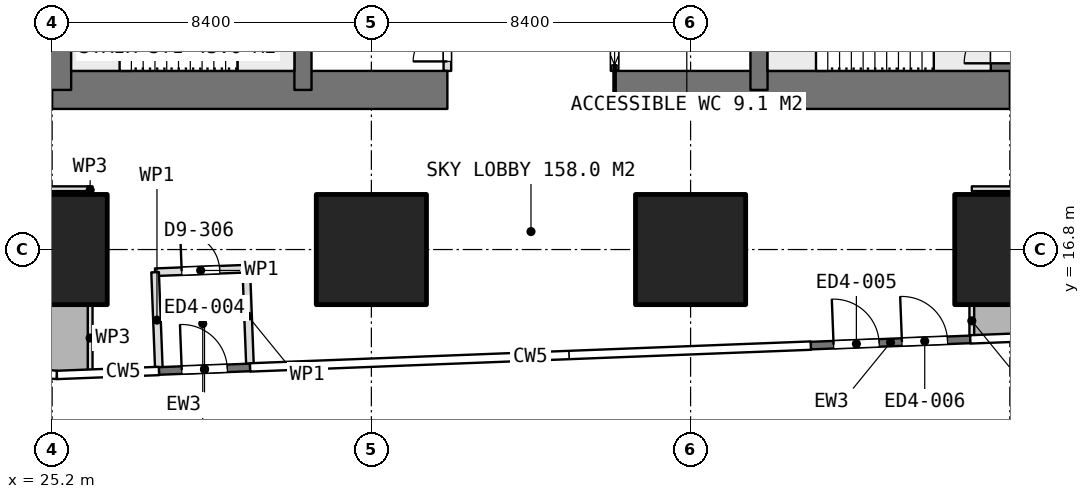
"""IFC4 building model, lengths in metres.
Left out: names, types, materials, properties, quantities, classifications, styles, units other than length and angle.
Written with IfcOpenShell. Run it as: python <this file> out.ifc"""

import sys

from ifc_helpers import new_model, si_unit, direction, frame, frame_2d, origin, origin_2d, place, context, subcontext, project, spatial, rectangle, extrude, element, fill, save


model = new_model("IFC4")
c1 = context("Model", 3, precision=1e-05, world=origin(), true_north=direction((0.0, 1.0)))
c2 = subcontext(c1, "Body", "Model", "MODEL_VIEW")
j1 = project(units=[si_unit("LENGTHUNIT", "METRE"), si_unit("PLANEANGLEUNIT", "RADIAN")], contexts=[c1])
p1 = place(None, origin())
s1 = spatial("IfcSite", under=j1, at=p1, CompositionType="ELEMENT")
p2 = place(p1, origin())
s2 = spatial("IfcBuilding", under=s1, at=p2, CompositionType="ELEMENT")
p3 = place(p2, frame((0.0, 0.0, 90.8)))
s3 = spatial("IfcBuildingStorey", under=s2, at=p3, CompositionType="ELEMENT", Elevation=90.8)
p4 = place(p3, frame((25.2, 21.0, 0.0), z_axis=(0.0, 0.0, 1.0), x_axis=(1.0, 0.0, 0.0)))
e1 = element("IfcWall", 1, at=p4, inside=s3, PredefinedType="SHEAR", context=c2, shape_type="SweptSolid", body=[
    extrude(rectangle(XDim=10.4, YDim=1.0, at=frame_2d((5.2, 0.0))), origin(), (0.0, 0.0, 1.0), 4.5),
])
p5 = place(p3, frame((40.0, 21.0, 0.0), z_axis=(0.0, 0.0, 1.0), x_axis=(1.0, 0.0, 0.0)))
e2 = element("IfcWall", 2, at=p5, inside=s3, PredefinedType="SHEAR", context=c2, shape_type="SweptSolid", body=[
    extrude(rectangle(XDim=10.4, YDim=1.0, at=frame_2d((5.2, 0.0))), origin(), (0.0, 0.0, 1.0), 4.5),
])
p6 = place(p3, frame((25.2, 21.0, 0.0), z_axis=(0.0, 0.0, 1.0), x_axis=(0.0, 1.0, 0.0)))
e3 = element("IfcWall", 3, at=p6, inside=s3, PredefinedType="SHEAR", context=c2, shape_type="SweptSolid", body=[
    extrude(rectangle(XDim=25.2, YDim=1.0, at=frame_2d((12.6, 0.0))), origin(), (0.0, 0.0, 1.0), 4.5),
])
p7 = place(p6, frame((7.8, 0.0, 0.0)))
e4 = element("IfcOpeningElement", 4, at=p7, cuts=e3, PredefinedType="OPENING", context=c2, shape_type="SweptSolid", body=[
    extrude(rectangle(XDim=1.2, YDim=2.1, at=frame_2d((0.6, 1.05))), frame((0.0, 0.51, 0.0), z_axis=(0.0, -1.0, 0.0), x_axis=(1.0, 0.0, 0.0)), (0.0, 0.0, 1.0), 1.02),
])
p8 = place(p6, frame((14.25, 0.0, 0.0)))
e5 = element("IfcOpeningElement", 5, at=p8, cuts=e3, PredefinedType="OPENING", context=c2, shape_type="SweptSolid", body=[
    extrude(rectangle(XDim=0.9, YDim=2.1, at=frame_2d((0.45, 1.05))), frame((0.0, 0.51, 0.0), z_axis=(0.0, -1.0, 0.0), x_axis=(1.0, 0.0, 0.0)), (0.0, 0.0, 1.0), 1.02),
])
p9 = place(p6, frame((16.85, 0.0, 0.0)))
e6 = element("IfcOpeningElement", 6, at=p9, cuts=e3, PredefinedType="OPENING", context=c2, shape_type="SweptSolid", body=[
    extrude(rectangle(XDim=0.9, YDim=2.1, at=frame_2d((0.45, 1.05))), frame((0.0, 0.51, 0.0), z_axis=(0.0, -1.0, 0.0), x_axis=(1.0, 0.0, 0.0)), (0.0, 0.0, 1.0), 1.02),
])
p10 = place(p6, frame((19.025, 0.0, 0.0)))
e7 = element("IfcOpeningElement", 7, at=p10, cuts=e3, PredefinedType="OPENING", context=c2, shape_type="SweptSolid", body=[
    extrude(rectangle(XDim=1.2, YDim=2.1, at=frame_2d((0.6, 1.05))), frame((0.0, 0.51, 0.0), z_axis=(0.0, -1.0, 0.0), x_axis=(1.0, 0.0, 0.0)), (0.0, 0.0, 1.0), 1.02),
])
p11 = place(p3, frame((50.4, 21.0, 0.0), z_axis=(0.0, 0.0, 1.0), x_axis=(0.0, 1.0, 0.0)))
e8 = element("IfcWall", 8, at=p11, inside=s3, PredefinedType="SHEAR", context=c2, shape_type="SweptSolid", body=[
    extrude(rectangle(XDim=25.2, YDim=1.0, at=frame_2d((12.6, 0.0))), origin(), (0.0, 0.0, 1.0), 4.5),
])
p12 = place(p11, frame((16.2, 0.0, 0.0)))
e9 = element("IfcOpeningElement", 9, at=p12, cuts=e8, PredefinedType="OPENING", context=c2, shape_type="SweptSolid", body=[
    extrude(rectangle(XDim=1.2, YDim=2.1, at=frame_2d((0.6, 1.05))), frame((0.0, 0.51, 0.0), z_axis=(0.0, -1.0, 0.0), x_axis=(1.0, 0.0, 0.0)), (0.0, 0.0, 1.0), 1.02),
])
p13 = place(p11, frame((10.05, 0.0, 0.0)))
e10 = element("IfcOpeningElement", 10, at=p13, cuts=e8, PredefinedType="OPENING", context=c2, shape_type="SweptSolid", body=[
    extrude(rectangle(XDim=0.9, YDim=2.1, at=frame_2d((0.45, 1.05))), frame((0.0, 0.51, 0.0), z_axis=(0.0, -1.0, 0.0), x_axis=(1.0, 0.0, 0.0)), (0.0, 0.0, 1.0), 1.02),
])
p14 = place(p11, frame((7.45, 0.0, 0.0)))
e11 = element("IfcOpeningElement", 11, at=p14, cuts=e8, PredefinedType="OPENING", context=c2, shape_type="SweptSolid", body=[
    extrude(rectangle(XDim=0.9, YDim=2.1, at=frame_2d((0.45, 1.05))), frame((0.0, 0.51, 0.0), z_axis=(0.0, -1.0, 0.0), x_axis=(1.0, 0.0, 0.0)), (0.0, 0.0, 1.0), 1.02),
])
p15 = place(p11, frame((0.7, 0.0, 0.0)))
e12 = element("IfcOpeningElement", 12, at=p15, cuts=e8, PredefinedType="OPENING", context=c2, shape_type="SweptSolid", body=[
    extrude(rectangle(XDim=1.2, YDim=2.1, at=frame_2d((0.6, 1.05))), frame((0.0, 0.51, 0.0), z_axis=(0.0, -1.0, 0.0), x_axis=(1.0, 0.0, 0.0)), (0.0, 0.0, 1.0), 1.02),
])
for number, where, z_axis, x_axis in (
    (13, (31.8, 21.0, 0.0), (0.0, 0.0, 1.0), (0.0, 1.0, 0.0)),
    (14, (43.8, 21.0, 0.0), (0.0, 0.0, 1.0), (0.0, 1.0, 0.0)),
):
    element("IfcWall", number, at=place(p3, frame(where, z_axis=z_axis, x_axis=x_axis)), inside=s3, PredefinedType="SHEAR", context=c2, shape_type="SweptSolid", body=[
        extrude(rectangle(XDim=25.2, YDim=0.45, at=frame_2d((12.6, 0.0))), origin(), (0.0, 0.0, 1.0), 4.5),
    ])
for number, where, z_axis, x_axis in (
    (15, (25.2, 16.8, 0.0), (0.0, 0.0, 1.0), (1.0, 0.0, 0.0)),
    (16, (33.6, 16.8, 0.0), (0.0, 0.0, 1.0), (1.0, 0.0, 0.0)),
    (17, (42.0, 16.8, 0.0), (0.0, 0.0, 1.0), (1.0, 0.0, 0.0)),
    (18, (50.4, 16.8, 0.0), (0.0, 0.0, 1.0), (1.0, 0.0, 0.0)),
):
    element("IfcColumn", number, at=place(p3, frame(where, z_axis=z_axis, x_axis=x_axis)), inside=s3, PredefinedType="COLUMN", context=c2, shape_type="SweptSolid", body=[
        extrude(rectangle(XDim=2.9, YDim=2.9, at=origin_2d()), origin(), (0.0, 0.0, 1.0), 4.5),
    ])
p16 = place(p3, frame((45.163, 14.272, 0.0), z_axis=(0.0, 0.0, 1.0), x_axis=(0.999243554769, 0.03888853625, 0.0)))
e19 = element("IfcWall", 19, at=p16, inside=s3, PredefinedType="SOLIDWALL", context=c2, shape_type="SweptSolid", body=[
    extrude(rectangle(XDim=4.2, YDim=0.2, at=frame_2d((2.1, 0.0))), origin(), (0.0, 0.0, 1.0), 4.25),
])
p17 = place(p16, frame((0.6, 0.0, 0.0)))
e20 = element("IfcOpeningElement", 20, at=p17, cuts=e19, PredefinedType="OPENING", context=c2, shape_type="SweptSolid", body=[
    extrude(rectangle(XDim=1.2, YDim=2.4, at=frame_2d((0.6, 1.2))), frame((0.0, 0.11, 0.0), z_axis=(0.0, -1.0, 0.0), x_axis=(1.0, 0.0, 0.0)), (0.0, 0.0, 1.0), 0.22),
])
p18 = place(p16, frame((2.4, 0.0, 0.0)))
e21 = element("IfcOpeningElement", 21, at=p18, cuts=e19, PredefinedType="OPENING", context=c2, shape_type="SweptSolid", body=[
    extrude(rectangle(XDim=1.2, YDim=2.4, at=frame_2d((0.6, 1.2))), frame((0.0, 0.11, 0.0), z_axis=(0.0, -1.0, 0.0), x_axis=(1.0, 0.0, 0.0)), (0.0, 0.0, 1.0), 0.22),
])
p19 = place(p3, frame((28.01, 13.605, 0.0), z_axis=(0.0, 0.0, 1.0), x_axis=(0.999240750633, 0.038960521988, 0.0)))
e22 = element("IfcWall", 22, at=p19, inside=s3, PredefinedType="SOLIDWALL", context=c2, shape_type="SweptSolid", body=[
    extrude(rectangle(XDim=2.4, YDim=0.2, at=frame_2d((1.2, 0.0))), origin(), (0.0, 0.0, 1.0), 4.25),
])
p20 = place(p19, frame((0.6, 0.0, 0.0)))
e23 = element("IfcOpeningElement", 23, at=p20, cuts=e22, PredefinedType="OPENING", context=c2, shape_type="SweptSolid", body=[
    extrude(rectangle(XDim=1.2, YDim=2.4, at=frame_2d((0.6, 1.2))), frame((0.0, 0.11, 0.0), z_axis=(0.0, -1.0, 0.0), x_axis=(1.0, 0.0, 0.0)), (0.0, 0.0, 1.0), 0.22),
])
p21 = place(p3, frame((40.0, 21.5, 0.0), z_axis=(0.0, 0.0, 1.0), x_axis=(0.0, 1.0, 0.0)))
e24 = element("IfcWall", 24, at=p21, inside=s3, PredefinedType="PARTITIONING", context=c2, shape_type="SweptSolid", body=[
    extrude(rectangle(XDim=1.675, YDim=0.2, at=frame_2d((0.837, 0.0))), origin(), (0.0, 0.0, 1.0), 4.25),
])
p22 = place(p21, frame((0.15, 0.0, 0.0)))
e25 = element("IfcOpeningElement", 25, at=p22, cuts=e24, PredefinedType="OPENING", context=c2, shape_type="SweptSolid", body=[
    extrude(rectangle(XDim=1.1, YDim=2.1, at=frame_2d((0.55, 1.05))), frame((0.0, 0.11, 0.0), z_axis=(0.0, -1.0, 0.0), x_axis=(1.0, 0.0, 0.0)), (0.0, 0.0, 1.0), 0.22),
])
p23 = place(p3, frame((35.6, 21.5, 0.0), z_axis=(0.0, 0.0, 1.0), x_axis=(0.0, 1.0, 0.0)))
e26 = element("IfcWall", 26, at=p23, inside=s3, PredefinedType="PARTITIONING", context=c2, shape_type="SweptSolid", body=[
    extrude(rectangle(XDim=1.675, YDim=0.2, at=frame_2d((0.837, 0.0))), origin(), (0.0, 0.0, 1.0), 4.25),
])
p24 = place(p23, frame((0.25, 0.0, 0.0)))
e27 = element("IfcOpeningElement", 27, at=p24, cuts=e26, PredefinedType="OPENING", context=c2, shape_type="SweptSolid", body=[
    extrude(rectangle(XDim=0.9, YDim=2.1, at=frame_2d((0.45, 1.05))), frame((0.0, 0.11, 0.0), z_axis=(0.0, -1.0, 0.0), x_axis=(1.0, 0.0, 0.0)), (0.0, 0.0, 1.0), 0.22),
])
p25 = place(p3, frame((49.4, 18.4, 0.0), z_axis=(0.0, 0.0, 1.0), x_axis=(1.0, 0.0, 0.0)))
e28 = element("IfcWall", 28, at=p25, inside=s3, PredefinedType="PARTITIONING", context=c2, shape_type="SweptSolid", body=[
    extrude(rectangle(XDim=7.0, YDim=0.125, at=frame_2d((3.5, 0.0))), origin(), (0.0, 0.0, 1.0), 4.25),
])
p26 = place(p3, frame((49.4, 14.517, 0.0), z_axis=(0.0, 0.0, 1.0), x_axis=(0.0, 1.0, 0.0)))
e29 = element("IfcWall", 29, at=p26, inside=s3, PredefinedType="PARTITIONING", context=c2, shape_type="SweptSolid", body=[
    extrude(rectangle(XDim=0.813, YDim=0.125, at=frame_2d((0.406, 0.0))), origin(), (0.0, 0.0, 1.0), 4.25),
])
p27 = place(p3, frame((19.2, 18.4, 0.0), z_axis=(0.0, 0.0, 1.0), x_axis=(1.0, 0.0, 0.0)))
e30 = element("IfcWall", 30, at=p27, inside=s3, PredefinedType="PARTITIONING", context=c2, shape_type="SweptSolid", body=[
    extrude(rectangle(XDim=7.0, YDim=0.125, at=frame_2d((3.5, 0.0))), origin(), (0.0, 0.0, 1.0), 4.25),
])
p28 = place(p27, frame((2.6, 0.0, 0.0)))
e31 = element("IfcOpeningElement", 31, at=p28, cuts=e30, PredefinedType="OPENING", context=c2, shape_type="SweptSolid", body=[
    extrude(rectangle(XDim=1.8, YDim=2.1, at=frame_2d((0.9, 1.05))), frame((0.0, 0.073, 0.0), z_axis=(0.0, -1.0, 0.0), x_axis=(1.0, 0.0, 0.0)), (0.0, 0.0, 1.0), 0.145),
])
p29 = place(p3, frame((26.2, 15.33, 0.0), z_axis=(0.0, 0.0, 1.0), x_axis=(0.0, -1.0, 0.0)))
e32 = element("IfcWall", 32, at=p29, inside=s3, PredefinedType="PARTITIONING", context=c2, shape_type="SweptSolid", body=[
    extrude(rectangle(XDim=1.716, YDim=0.125, at=frame_2d((0.858, 0.0))), origin(), (0.0, 0.0, 1.0), 4.25),
])
p30 = place(p3, frame((27.909, 16.203, 0.0), z_axis=(0.0, 0.0, 1.0), x_axis=(0.999248497687, 0.038761319244, 0.0)))
e33 = element("IfcWall", 33, at=p30, inside=s3, PredefinedType="PARTITIONING", context=c2, shape_type="SweptSolid", body=[
    extrude(rectangle(XDim=2.4, YDim=0.2, at=frame_2d((1.2, 0.0))), origin(), (0.0, 0.0, 1.0), 4.25),
])
p31 = place(p30, frame((0.7, 0.0, 0.0)))
e34 = element("IfcOpeningElement", 34, at=p31, cuts=e33, PredefinedType="OPENING", context=c2, shape_type="SweptSolid", body=[
    extrude(rectangle(XDim=1.0, YDim=2.1, at=frame_2d((0.5, 1.05))), frame((0.0, 0.11, 0.0), z_axis=(0.0, -1.0, 0.0), x_axis=(1.0, 0.0, 0.0)), (0.0, 0.0, 1.0), 0.22),
])
p32 = place(p3, frame((30.307, 16.296, 0.0), z_axis=(0.0, 0.0, 1.0), x_axis=(0.038871976468, -0.999244199105, 0.0)))
e35 = element("IfcWall", 35, at=p32, inside=s3, PredefinedType="PARTITIONING", context=c2, shape_type="SweptSolid", body=[
    extrude(rectangle(XDim=2.5, YDim=0.2, at=frame_2d((1.25, 0.0))), origin(), (0.0, 0.0, 1.0), 4.25),
])
p33 = place(p3, frame((28.007, 13.684, 0.0), z_axis=(0.0, 0.0, 1.0), x_axis=(-0.038935269694, 0.999241734904, 0.0)))
e36 = element("IfcWall", 36, at=p33, inside=s3, PredefinedType="PARTITIONING", context=c2, shape_type="SweptSolid", body=[
    extrude(rectangle(XDim=2.521, YDim=0.2, at=frame_2d((1.26, 0.0))), origin(), (0.0, 0.0, 1.0), 4.25),
])
p34 = place(p3, frame((26.2, 18.462, 0.0), z_axis=(0.0, 0.0, 1.0), x_axis=(0.0, -1.0, 0.0)))
e37 = element("IfcWall", 37, at=p34, inside=s3, PredefinedType="PARTITIONING", context=c2, shape_type="SweptSolid", body=[
    extrude(rectangle(XDim=0.192, YDim=0.125, at=frame_2d((0.096, 0.0))), origin(), (0.0, 0.0, 1.0), 4.25),
])
p35 = place(p17, origin())
e38 = element("IfcDoor", 38, at=p35, inside=s3, OperationType="SINGLE_SWING_LEFT", PredefinedType="DOOR", context=c2, shape_type="SweptSolid", body=[
    extrude(rectangle(XDim=1.2, YDim=2.4, at=frame_2d((0.6, 1.2))), frame((0.0, 0.025, 0.0), z_axis=(0.0, -1.0, 0.0), x_axis=(1.0, 0.0, 0.0)), (0.0, 0.0, 1.0), 0.05),
])
fill(e20, e38)
p36 = place(p18, origin())
e39 = element("IfcDoor", 39, at=p36, inside=s3, OperationType="SINGLE_SWING_LEFT", PredefinedType="DOOR", context=c2, shape_type="SweptSolid", body=[
    extrude(rectangle(XDim=1.2, YDim=2.4, at=frame_2d((0.6, 1.2))), frame((0.0, 0.025, 0.0), z_axis=(0.0, -1.0, 0.0), x_axis=(1.0, 0.0, 0.0)), (0.0, 0.0, 1.0), 0.05),
])
fill(e21, e39)
p37 = place(p20, origin())
e40 = element("IfcDoor", 40, at=p37, inside=s3, OperationType="SINGLE_SWING_LEFT", PredefinedType="DOOR", context=c2, shape_type="SweptSolid", body=[
    extrude(rectangle(XDim=1.2, YDim=2.4, at=frame_2d((0.6, 1.2))), frame((0.0, 0.025, 0.0), z_axis=(0.0, -1.0, 0.0), x_axis=(1.0, 0.0, 0.0)), (0.0, 0.0, 1.0), 0.05),
])
fill(e23, e40)
p38 = place(p22, origin())
e41 = element("IfcDoor", 41, at=p38, inside=s3, OperationType="SLIDING_TO_LEFT", PredefinedType="DOOR", context=c2, shape_type="SweptSolid", body=[
    extrude(rectangle(XDim=1.1, YDim=2.1, at=frame_2d((0.55, 1.05))), frame((0.0, 0.025, 0.0), z_axis=(0.0, -1.0, 0.0), x_axis=(1.0, 0.0, 0.0)), (0.0, 0.0, 1.0), 0.05),
])
fill(e25, e41)
p39 = place(p24, origin())
e42 = element("IfcDoor", 42, at=p39, inside=s3, OperationType="SINGLE_SWING_LEFT", PredefinedType="DOOR", context=c2, shape_type="SweptSolid", body=[
    extrude(rectangle(XDim=0.9, YDim=2.1, at=frame_2d((0.45, 1.05))), frame((0.0, 0.025, 0.0), z_axis=(0.0, -1.0, 0.0), x_axis=(1.0, 0.0, 0.0)), (0.0, 0.0, 1.0), 0.05),
])
fill(e27, e42)
p40 = place(p31, origin())
e43 = element("IfcDoor", 43, at=p40, inside=s3, OperationType="SINGLE_SWING_LEFT", PredefinedType="DOOR", context=c2, shape_type="SweptSolid", body=[
    extrude(rectangle(XDim=1.0, YDim=2.1, at=frame_2d((0.5, 1.05))), frame((0.0, 0.025, 0.0), z_axis=(0.0, -1.0, 0.0), x_axis=(1.0, 0.0, 0.0)), (0.0, 0.0, 1.0), 0.05),
])
fill(e34, e43)
p41 = place(p15, origin())
e44 = element("IfcDoor", 44, at=p41, inside=s3, OperationType="SINGLE_SWING_RIGHT", PredefinedType="DOOR", context=c2, shape_type="SweptSolid", body=[
    extrude(rectangle(XDim=1.2, YDim=2.1, at=frame_2d((0.6, 1.05))), frame((0.0, 0.025, 0.0), z_axis=(0.0, -1.0, 0.0), x_axis=(1.0, 0.0, 0.0)), (0.0, 0.0, 1.0), 0.05),
])
fill(e12, e44)
save(model, sys.argv[1])
